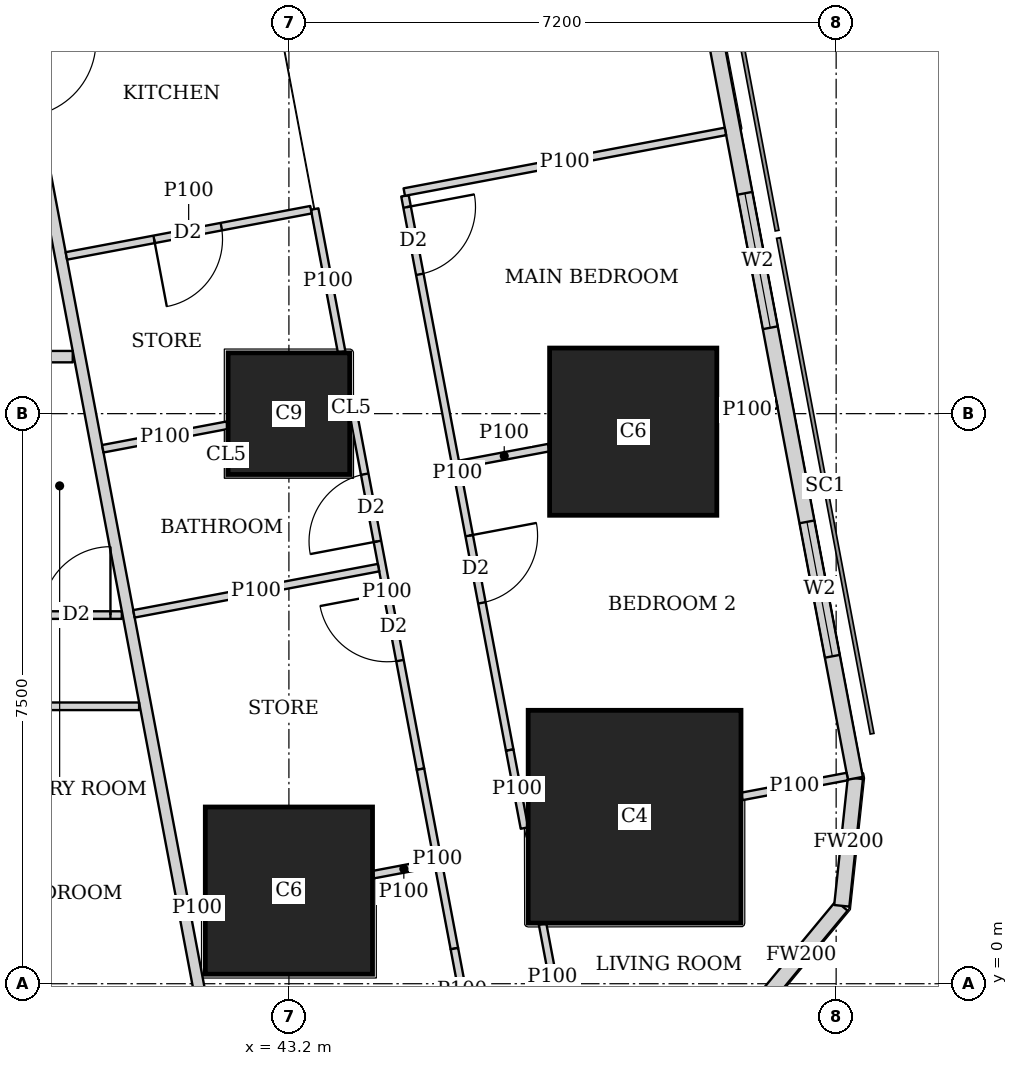
"""IFC4 building model, lengths in metres.
Left out: names, types, materials, properties, quantities, classifications, styles, units other than length and angle.
Written with IfcOpenShell. Run it as: python <this file> out.ifc"""

import sys

from ifc_helpers import new_model, si_unit, direction, frame, frame_2d, origin, origin_2d, place, context, subcontext, project, spatial, rectangle, extrude, element, fill, save


model = new_model("IFC4")
c1 = context("Model", 3, precision=1e-05, world=origin(), true_north=direction((0.0, 1.0)))
c2 = subcontext(c1, "Body", "Model", "MODEL_VIEW")
j1 = project(units=[si_unit("LENGTHUNIT", "METRE"), si_unit("PLANEANGLEUNIT", "RADIAN")], contexts=[c1])
p1 = place(None, origin())
s1 = spatial("IfcSite", under=j1, at=p1, CompositionType="ELEMENT")
p2 = place(p1, origin())
s2 = spatial("IfcBuilding", under=s1, at=p2, CompositionType="ELEMENT")
p3 = place(p2, frame((0.0, 0.0, 100.4)))
s3 = spatial("IfcBuildingStorey", under=s2, at=p3, CompositionType="ELEMENT", Elevation=100.4)
p4 = place(p3, frame((43.2, 1.225, 0.0), z_axis=(0.0, 0.0, 1.0), x_axis=(1.0, 0.0, 0.0)))
e1 = element("IfcColumn", 1, at=p4, inside=s3, PredefinedType="COLUMN", context=c2, shape_type="SweptSolid", body=[
    extrude(rectangle(XDim=2.2, YDim=2.2, at=origin_2d()), origin(), (0.0, 0.0, 1.0), 3.75),
])
p5 = place(p3, frame((47.748, 2.197, 0.0), z_axis=(0.0, 0.0, 1.0), x_axis=(1.0, 0.0, 0.0)))
e2 = element("IfcColumn", 2, at=p5, inside=s3, PredefinedType="COLUMN", context=c2, shape_type="SweptSolid", body=[
    extrude(rectangle(XDim=2.8, YDim=2.8, at=origin_2d()), origin(), (0.0, 0.0, 1.0), 3.75),
])
p6 = place(p3, frame((43.2, 7.5, 0.0), z_axis=(0.0, 0.0, 1.0), x_axis=(1.0, 0.0, 0.0)))
e3 = element("IfcColumn", 3, at=p6, inside=s3, PredefinedType="COLUMN", context=c2, shape_type="SweptSolid", body=[
    extrude(rectangle(XDim=1.6, YDim=1.6, at=origin_2d()), origin(), (0.0, 0.0, 1.0), 3.75),
])
p7 = place(p3, frame((47.73, 7.263, 0.0), z_axis=(0.0, 0.0, 1.0), x_axis=(1.0, 0.0, 0.0)))
e4 = element("IfcColumn", 4, at=p7, inside=s3, PredefinedType="COLUMN", context=c2, shape_type="SweptSolid", body=[
    extrude(rectangle(XDim=2.2, YDim=2.2, at=origin_2d()), origin(), (0.0, 0.0, 1.0), 3.75),
])
p8 = place(p3, frame((49.407, -0.263, 0.0), z_axis=(0.0, 0.0, 1.0), x_axis=(0.638042593423, 0.770001070764, 0.0)))
e5 = element("IfcWall", 5, at=p8, inside=s3, PredefinedType="SOLIDWALL", context=c2, shape_type="SweptSolid", body=[
    extrude(rectangle(XDim=1.673, YDim=0.2, at=frame_2d((0.836, 0.0))), origin(), (0.0, 0.0, 1.0), 3.5),
])
p9 = place(p3, frame((50.474, 1.025, 0.0), z_axis=(0.0, 0.0, 1.0), x_axis=(0.106047815515, 0.994361031429, 0.0)))
e6 = element("IfcWall", 6, at=p9, inside=s3, PredefinedType="SOLIDWALL", context=c2, shape_type="SweptSolid", body=[
    extrude(rectangle(XDim=1.688, YDim=0.2, at=frame_2d((0.844, 0.0))), origin(), (0.0, 0.0, 1.0), 3.5),
])
p10 = place(p3, frame((50.653, 2.703, 0.0), z_axis=(0.0, 0.0, 1.0), x_axis=(-0.185612026696, 0.982623109613, 0.0)))
e7 = element("IfcWall", 7, at=p10, inside=s3, PredefinedType="SOLIDWALL", context=c2, shape_type="SweptSolid", body=[
    extrude(rectangle(XDim=41.393, YDim=0.2, at=frame_2d((20.697, 0.0))), origin(), (0.0, 0.0, 1.0), 3.5),
])
p11 = place(p10, frame((1.633, 0.0, 0.9)))
e8 = element("IfcOpeningElement", 8, at=p11, cuts=e7, PredefinedType="OPENING", context=c2, shape_type="SweptSolid", body=[
    extrude(rectangle(XDim=1.8, YDim=1.5, at=frame_2d((0.9, 0.75))), frame((0.0, 0.11, 0.0), z_axis=(0.0, -1.0, 0.0), x_axis=(1.0, 0.0, 0.0)), (0.0, 0.0, 1.0), 0.22),
])
p12 = place(p10, frame((6.032, 0.0, 0.9)))
e9 = element("IfcOpeningElement", 9, at=p12, cuts=e7, PredefinedType="OPENING", context=c2, shape_type="SweptSolid", body=[
    extrude(rectangle(XDim=1.8, YDim=1.5, at=frame_2d((0.9, 0.75))), frame((0.0, 0.11, 0.0), z_axis=(0.0, -1.0, 0.0), x_axis=(1.0, 0.0, 0.0)), (0.0, 0.0, 1.0), 0.22),
])
p13 = place(p10, frame((9.848, 0.0, 0.9)))
e10 = element("IfcOpeningElement", 10, at=p13, cuts=e7, PredefinedType="OPENING", context=c2, shape_type="SweptSolid", body=[
    extrude(rectangle(XDim=1.8, YDim=1.5, at=frame_2d((0.9, 0.75))), frame((0.0, 0.11, 0.0), z_axis=(0.0, -1.0, 0.0), x_axis=(1.0, 0.0, 0.0)), (0.0, 0.0, 1.0), 0.22),
])
p14 = place(p10, frame((13.664, 0.0, 0.9)))
e11 = element("IfcOpeningElement", 11, at=p14, cuts=e7, PredefinedType="OPENING", context=c2, shape_type="SweptSolid", body=[
    extrude(rectangle(XDim=1.8, YDim=1.5, at=frame_2d((0.9, 0.75))), frame((0.0, 0.11, 0.0), z_axis=(0.0, -1.0, 0.0), x_axis=(1.0, 0.0, 0.0)), (0.0, 0.0, 1.0), 0.22),
])
p15 = place(p10, frame((17.481, 0.0, 0.9)))
e12 = element("IfcOpeningElement", 12, at=p15, cuts=e7, PredefinedType="OPENING", context=c2, shape_type="SweptSolid", body=[
    extrude(rectangle(XDim=1.8, YDim=1.5, at=frame_2d((0.9, 0.75))), frame((0.0, 0.11, 0.0), z_axis=(0.0, -1.0, 0.0), x_axis=(1.0, 0.0, 0.0)), (0.0, 0.0, 1.0), 0.22),
])
p16 = place(p10, frame((21.297, 0.0, 0.9)))
e13 = element("IfcOpeningElement", 13, at=p16, cuts=e7, PredefinedType="OPENING", context=c2, shape_type="SweptSolid", body=[
    extrude(rectangle(XDim=1.8, YDim=1.5, at=frame_2d((0.9, 0.75))), frame((0.0, 0.11, 0.0), z_axis=(0.0, -1.0, 0.0), x_axis=(1.0, 0.0, 0.0)), (0.0, 0.0, 1.0), 0.22),
])
p17 = place(p10, frame((25.113, 0.0, 0.9)))
e14 = element("IfcOpeningElement", 14, at=p17, cuts=e7, PredefinedType="OPENING", context=c2, shape_type="SweptSolid", body=[
    extrude(rectangle(XDim=1.8, YDim=1.5, at=frame_2d((0.9, 0.75))), frame((0.0, 0.11, 0.0), z_axis=(0.0, -1.0, 0.0), x_axis=(1.0, 0.0, 0.0)), (0.0, 0.0, 1.0), 0.22),
])
p18 = place(p10, frame((28.93, 0.0, 0.9)))
e15 = element("IfcOpeningElement", 15, at=p18, cuts=e7, PredefinedType="OPENING", context=c2, shape_type="SweptSolid", body=[
    extrude(rectangle(XDim=1.8, YDim=1.5, at=frame_2d((0.9, 0.75))), frame((0.0, 0.11, 0.0), z_axis=(0.0, -1.0, 0.0), x_axis=(1.0, 0.0, 0.0)), (0.0, 0.0, 1.0), 0.22),
])
p19 = place(p10, frame((32.746, 0.0, 0.9)))
e16 = element("IfcOpeningElement", 16, at=p19, cuts=e7, PredefinedType="OPENING", context=c2, shape_type="SweptSolid", body=[
    extrude(rectangle(XDim=1.8, YDim=1.5, at=frame_2d((0.9, 0.75))), frame((0.0, 0.11, 0.0), z_axis=(0.0, -1.0, 0.0), x_axis=(1.0, 0.0, 0.0)), (0.0, 0.0, 1.0), 0.22),
])
p20 = place(p10, frame((36.481, 0.0, 0.9)))
e17 = element("IfcOpeningElement", 17, at=p20, cuts=e7, PredefinedType="OPENING", context=c2, shape_type="SweptSolid", body=[
    extrude(rectangle(XDim=1.8, YDim=1.5, at=frame_2d((0.9, 0.75))), frame((0.0, 0.11, 0.0), z_axis=(0.0, -1.0, 0.0), x_axis=(1.0, 0.0, 0.0)), (0.0, 0.0, 1.0), 0.22),
])
p21 = place(p3, frame((40.356, 8.25, 0.0), z_axis=(0.0, 0.0, 1.0), x_axis=(-1.0, 0.0, 0.0)))
e18 = element("IfcWall", 18, at=p21, inside=s3, PredefinedType="SOLIDWALL", context=c2, shape_type="SweptSolid", body=[
    extrude(rectangle(XDim=3.555, YDim=0.15, at=frame_2d((1.777, 0.0))), origin(), (0.0, 0.0, 1.0), 3.5),
])
p22 = place(p3, frame((33.382, 45.65, 0.0), z_axis=(0.0, 0.0, 1.0), x_axis=(0.185593544777, -0.982626600565, 0.0)))
e19 = element("IfcWall", 19, at=p22, inside=s3, PredefinedType="SOLIDWALL", context=c2, shape_type="SweptSolid", body=[
    extrude(rectangle(XDim=47.118, YDim=0.15, at=frame_2d((23.559, 0.0))), origin(), (0.0, 0.0, 1.0), 2.2),
])
p23 = place(p22, frame((10.662, 0.0, 0.0)))
e20 = element("IfcOpeningElement", 20, at=p23, cuts=e19, PredefinedType="OPENING", context=c2, shape_type="SweptSolid", body=[
    extrude(rectangle(XDim=1.0, YDim=2.1, at=frame_2d((0.5, 1.05))), frame((0.0, 0.085, 0.0), z_axis=(0.0, -1.0, 0.0), x_axis=(1.0, 0.0, 0.0)), (0.0, 0.0, 1.0), 0.17),
])
p24 = place(p22, frame((15.237, 0.0, 0.0)))
e21 = element("IfcOpeningElement", 21, at=p24, cuts=e19, PredefinedType="OPENING", context=c2, shape_type="SweptSolid", body=[
    extrude(rectangle(XDim=1.0, YDim=2.1, at=frame_2d((0.5, 1.05))), frame((0.0, 0.085, 0.0), z_axis=(0.0, -1.0, 0.0), x_axis=(1.0, 0.0, 0.0)), (0.0, 0.0, 1.0), 0.17),
])
p25 = place(p22, frame((27.341, 0.0, 0.0)))
e22 = element("IfcOpeningElement", 22, at=p25, cuts=e19, PredefinedType="OPENING", context=c2, shape_type="SweptSolid", body=[
    extrude(rectangle(XDim=1.0, YDim=2.1, at=frame_2d((0.5, 1.05))), frame((0.0, 0.085, 0.0), z_axis=(0.0, -1.0, 0.0), x_axis=(1.0, 0.0, 0.0)), (0.0, 0.0, 1.0), 0.17),
])
p26 = place(p22, frame((33.833, 0.0, 0.0)))
e23 = element("IfcOpeningElement", 23, at=p26, cuts=e19, PredefinedType="OPENING", context=c2, shape_type="SweptSolid", body=[
    extrude(rectangle(XDim=1.0, YDim=2.1, at=frame_2d((0.5, 1.05))), frame((0.0, 0.085, 0.0), z_axis=(0.0, -1.0, 0.0), x_axis=(1.0, 0.0, 0.0)), (0.0, 0.0, 1.0), 0.17),
])
p27 = place(p3, frame((41.229, 3.65, 0.0), z_axis=(0.0, 0.0, 1.0), x_axis=(-1.0, 0.0, 0.0)))
e24 = element("IfcWall", 24, at=p27, inside=s3, PredefinedType="PARTITIONING", context=c2, shape_type="SweptSolid", body=[
    extrude(rectangle(XDim=5.229, YDim=0.1, at=frame_2d((2.615, 0.0))), origin(), (0.0, 0.0, 1.0), 3.5),
])
p28 = place(p27, frame((4.129, 0.0, 0.0)))
e25 = element("IfcOpeningElement", 25, at=p28, cuts=e24, PredefinedType="OPENING", context=c2, shape_type="SweptSolid", body=[
    extrude(rectangle(XDim=0.9, YDim=2.1, at=frame_2d((0.45, 1.05))), frame((0.0, 0.06, 0.0), z_axis=(0.0, -1.0, 0.0), x_axis=(1.0, 0.0, 0.0)), (0.0, 0.0, 1.0), 0.12),
])
p29 = place(p3, frame((41.002, 4.85, 0.0), z_axis=(0.0, 0.0, 1.0), x_axis=(-1.0, 0.0, 0.0)))
e26 = element("IfcWall", 26, at=p29, inside=s3, PredefinedType="PARTITIONING", context=c2, shape_type="SweptSolid", body=[
    extrude(rectangle(XDim=5.002, YDim=0.1, at=frame_2d((2.501, 0.0))), origin(), (0.0, 0.0, 1.0), 3.5),
])
p30 = place(p29, frame((3.447, 0.0, 0.0)))
e27 = element("IfcOpeningElement", 27, at=p30, cuts=e26, PredefinedType="OPENING", context=c2, shape_type="SweptSolid", body=[
    extrude(rectangle(XDim=0.9, YDim=2.1, at=frame_2d((0.45, 1.05))), frame((0.0, 0.06, 0.0), z_axis=(0.0, -1.0, 0.0), x_axis=(1.0, 0.0, 0.0)), (0.0, 0.0, 1.0), 0.12),
])
p31 = place(p29, frame((0.15, 0.0, 0.0)))
e28 = element("IfcOpeningElement", 28, at=p31, cuts=e26, PredefinedType="OPENING", context=c2, shape_type="SweptSolid", body=[
    extrude(rectangle(XDim=0.9, YDim=2.1, at=frame_2d((0.45, 1.05))), frame((0.0, 0.06, 0.0), z_axis=(0.0, -1.0, 0.0), x_axis=(1.0, 0.0, 0.0)), (0.0, 0.0, 1.0), 0.12),
])
p32 = place(p29, frame((1.647, 0.0, 0.0)))
e29 = element("IfcOpeningElement", 29, at=p32, cuts=e26, PredefinedType="OPENING", context=c2, shape_type="SweptSolid", body=[
    extrude(rectangle(XDim=0.9, YDim=2.1, at=frame_2d((0.45, 1.05))), frame((0.0, 0.06, 0.0), z_axis=(0.0, -1.0, 0.0), x_axis=(1.0, 0.0, 0.0)), (0.0, 0.0, 1.0), 0.12),
])
p33 = place(p3, frame((44.727, 10.366, 0.0), z_axis=(0.0, 0.0, 1.0), x_axis=(0.185678775129, -0.982610498858, 0.0)))
e30 = element("IfcWall", 30, at=p33, inside=s3, PredefinedType="PARTITIONING", context=c2, shape_type="SweptSolid", body=[
    extrude(rectangle(XDim=7.421, YDim=0.1, at=frame_2d((3.71, 0.0))), origin(), (0.0, 0.0, 1.0), 3.5),
])
p34 = place(p33, frame((0.151, 0.0, 0.0)))
e31 = element("IfcOpeningElement", 31, at=p34, cuts=e30, PredefinedType="OPENING", context=c2, shape_type="SweptSolid", body=[
    extrude(rectangle(XDim=0.9, YDim=2.1, at=frame_2d((0.45, 1.05))), frame((0.0, 0.06, 0.0), z_axis=(0.0, -1.0, 0.0), x_axis=(1.0, 0.0, 0.0)), (0.0, 0.0, 1.0), 0.12),
])
p35 = place(p33, frame((4.55, 0.0, 0.0)))
e32 = element("IfcOpeningElement", 32, at=p35, cuts=e30, PredefinedType="OPENING", context=c2, shape_type="SweptSolid", body=[
    extrude(rectangle(XDim=0.9, YDim=2.1, at=frame_2d((0.45, 1.05))), frame((0.0, 0.06, 0.0), z_axis=(0.0, -1.0, 0.0), x_axis=(1.0, 0.0, 0.0)), (0.0, 0.0, 1.0), 0.12),
])
p36 = place(p3, frame((46.105, 3.074, 0.0), z_axis=(0.0, 0.0, 1.0), x_axis=(0.185897769544, -0.982569091351, 0.0)))
e33 = element("IfcWall", 33, at=p36, inside=s3, PredefinedType="PARTITIONING", context=c2, shape_type="SweptSolid", body=[
    extrude(rectangle(XDim=1.044, YDim=0.1, at=frame_2d((0.522, 0.0))), origin(), (0.0, 0.0, 1.0), 2.05),
])
p37 = place(p3, frame((46.537, 0.787, 0.0), z_axis=(0.0, 0.0, 1.0), x_axis=(0.185348284603, -0.982672892368, 0.0)))
e34 = element("IfcWall", 34, at=p37, inside=s3, PredefinedType="PARTITIONING", context=c2, shape_type="SweptSolid", body=[
    extrude(rectangle(XDim=1.419, YDim=0.1, at=frame_2d((0.709, 0.0))), origin(), (0.0, 0.0, 1.0), 2.05),
])
p38 = place(p3, frame((43.539, 10.192, 0.0), z_axis=(0.0, 0.0, 1.0), x_axis=(0.185366049966, -0.982669541362, 0.0)))
e35 = element("IfcWall", 35, at=p38, inside=s3, PredefinedType="PARTITIONING", context=c2, shape_type="SweptSolid", body=[
    extrude(rectangle(XDim=1.915, YDim=0.1, at=frame_2d((0.958, 0.0))), origin(), (0.0, 0.0, 1.0), 3.5),
])
p39 = place(p3, frame((44.049, 7.49, 0.0), z_axis=(0.0, 0.0, 1.0), x_axis=(0.185666332607, -0.982612849975, 0.0)))
e36 = element("IfcWall", 36, at=p39, inside=s3, PredefinedType="PARTITIONING", context=c2, shape_type="SweptSolid", body=[
    extrude(rectangle(XDim=4.75, YDim=0.1, at=frame_2d((2.375, 0.0))), origin(), (0.0, 0.0, 1.0), 3.5),
])
p40 = place(p39, frame((0.8, 0.0, 0.0)))
e37 = element("IfcOpeningElement", 37, at=p40, cuts=e36, PredefinedType="OPENING", context=c2, shape_type="SweptSolid", body=[
    extrude(rectangle(XDim=0.9, YDim=2.1, at=frame_2d((0.45, 1.05))), frame((0.0, 0.06, 0.0), z_axis=(0.0, -1.0, 0.0), x_axis=(1.0, 0.0, 0.0)), (0.0, 0.0, 1.0), 0.12),
])
p41 = place(p39, frame((2.396, 0.0, 0.0)))
e38 = element("IfcOpeningElement", 38, at=p41, cuts=e36, PredefinedType="OPENING", context=c2, shape_type="SweptSolid", body=[
    extrude(rectangle(XDim=0.9, YDim=2.1, at=frame_2d((0.45, 1.05))), frame((0.0, 0.06, 0.0), z_axis=(0.0, -1.0, 0.0), x_axis=(1.0, 0.0, 0.0)), (0.0, 0.0, 1.0), 0.12),
])
p42 = place(p3, frame((44.931, 2.823, 0.0), z_axis=(0.0, 0.0, 1.0), x_axis=(0.185631845838, -0.982619365681, 0.0)))
e39 = element("IfcWall", 39, at=p42, inside=s3, PredefinedType="PARTITIONING", context=c2, shape_type="SweptSolid", body=[
    extrude(rectangle(XDim=2.403, YDim=0.1, at=frame_2d((1.201, 0.0))), origin(), (0.0, 0.0, 1.0), 2.05),
])
p43 = place(p3, frame((45.377, 0.462, 0.0), z_axis=(0.0, 0.0, 1.0), x_axis=(0.185513480919, -0.982641719243, 0.0)))
e40 = element("IfcWall", 40, at=p43, inside=s3, PredefinedType="PARTITIONING", context=c2, shape_type="SweptSolid", body=[
    extrude(rectangle(XDim=1.095, YDim=0.1, at=frame_2d((0.547, 0.0))), origin(), (0.0, 0.0, 1.0), 3.5),
])
p44 = place(p3, frame((48.943, 11.213, 0.0), z_axis=(0.0, 0.0, 1.0), x_axis=(-0.982633535512, -0.185556823879, 0.0)))
e41 = element("IfcWall", 41, at=p44, inside=s3, PredefinedType="PARTITIONING", context=c2, shape_type="SweptSolid", body=[
    extrude(rectangle(XDim=4.3, YDim=0.1, at=frame_2d((2.15, 0.0))), origin(), (0.0, 0.0, 1.0), 2.2),
])
p45 = place(p3, frame((49.622, 7.62, 0.0), z_axis=(0.0, 0.0, 1.0), x_axis=(-0.982512656401, -0.186195810938, 0.0)))
e42 = element("IfcWall", 42, at=p45, inside=s3, PredefinedType="PARTITIONING", context=c2, shape_type="SweptSolid", body=[
    extrude(rectangle(XDim=0.796, YDim=0.1, at=frame_2d((0.398, 0.0))), origin(), (0.0, 0.0, 1.0), 2.05),
])
p46 = place(p3, frame((46.62, 7.053, 0.0), z_axis=(0.0, 0.0, 1.0), x_axis=(-0.982749355621, -0.18494243436, 0.0)))
e43 = element("IfcWall", 43, at=p46, inside=s3, PredefinedType="PARTITIONING", context=c2, shape_type="SweptSolid", body=[
    extrude(rectangle(XDim=1.195, YDim=0.1, at=frame_2d((0.597, 0.0))), origin(), (0.0, 0.0, 1.0), 2.05),
])
p47 = place(p3, frame((50.547, 2.726, 0.0), z_axis=(0.0, 0.0, 1.0), x_axis=(-0.982680053146, -0.185310315822, 0.0)))
e44 = element("IfcWall", 44, at=p47, inside=s3, PredefinedType="PARTITIONING", context=c2, shape_type="SweptSolid", body=[
    extrude(rectangle(XDim=1.414, YDim=0.1, at=frame_2d((0.707, 0.0))), origin(), (0.0, 0.0, 1.0), 3.5),
])
p48 = place(p3, frame((43.49, 10.183, 0.0), z_axis=(0.0, 0.0, 1.0), x_axis=(-0.982607026909, -0.185697147715, 0.0)))
e45 = element("IfcWall", 45, at=p48, inside=s3, PredefinedType="PARTITIONING", context=c2, shape_type="SweptSolid", body=[
    extrude(rectangle(XDim=3.275, YDim=0.1, at=frame_2d((1.637, 0.0))), origin(), (0.0, 0.0, 1.0), 3.5),
])
p49 = place(p48, frame((1.2, 0.0, 0.0)))
e46 = element("IfcOpeningElement", 46, at=p49, cuts=e45, PredefinedType="OPENING", context=c2, shape_type="SweptSolid", body=[
    extrude(rectangle(XDim=0.9, YDim=2.1, at=frame_2d((0.45, 1.05))), frame((0.0, 0.06, 0.0), z_axis=(0.0, -1.0, 0.0), x_axis=(1.0, 0.0, 0.0)), (0.0, 0.0, 1.0), 0.12),
])
p50 = place(p3, frame((42.39, 7.348, 0.0), z_axis=(0.0, 0.0, 1.0), x_axis=(-0.9825976927, -0.185746532405, 0.0)))
e47 = element("IfcWall", 47, at=p50, inside=s3, PredefinedType="PARTITIONING", context=c2, shape_type="SweptSolid", body=[
    extrude(rectangle(XDim=1.668, YDim=0.1, at=frame_2d((0.834, 0.0))), origin(), (0.0, 0.0, 1.0), 3.5),
])
p51 = place(p3, frame((45.114, 1.587, 0.0), z_axis=(0.0, 0.0, 1.0), x_axis=(-0.982624706348, -0.185603573443, 0.0)))
e48 = element("IfcWall", 48, at=p51, inside=s3, PredefinedType="PARTITIONING", context=c2, shape_type="SweptSolid", body=[
    extrude(rectangle(XDim=0.818, YDim=0.1, at=frame_2d((0.409, 0.0))), origin(), (0.0, 0.0, 1.0), 2.05),
])
p52 = place(p3, frame((42.09, 1.016, 0.0), z_axis=(0.0, 0.0, 1.0), x_axis=(-0.982208563973, -0.187793335502, 0.0)))
e49 = element("IfcWall", 49, at=p52, inside=s3, PredefinedType="PARTITIONING", context=c2, shape_type="SweptSolid", body=[
    extrude(rectangle(XDim=0.198, YDim=0.1, at=frame_2d((0.099, 0.0))), origin(), (0.0, 0.0, 1.0), 2.05),
])
p53 = place(p3, frame((44.379, 5.474, 0.0), z_axis=(0.0, 0.0, 1.0), x_axis=(-0.982607026909, -0.185697147715, 0.0)))
e50 = element("IfcWall", 50, at=p53, inside=s3, PredefinedType="PARTITIONING", context=c2, shape_type="SweptSolid", body=[
    extrude(rectangle(XDim=3.275, YDim=0.1, at=frame_2d((1.637, 0.0))), origin(), (0.0, 0.0, 1.0), 3.5),
])
p54 = place(p11, origin())
e51 = element("IfcWindow", 51, at=p54, inside=s3, PartitioningType="SINGLE_PANEL", PredefinedType="WINDOW", context=c2, shape_type="SweptSolid", body=[
    extrude(rectangle(XDim=1.8, YDim=1.5, at=frame_2d((0.9, 0.75))), frame((0.0, 0.03, 0.0), z_axis=(0.0, -1.0, 0.0), x_axis=(1.0, 0.0, 0.0)), (0.0, 0.0, 1.0), 0.06),
])
fill(e8, e51)
p55 = place(p12, origin())
e52 = element("IfcWindow", 52, at=p55, inside=s3, PartitioningType="SINGLE_PANEL", PredefinedType="WINDOW", context=c2, shape_type="SweptSolid", body=[
    extrude(rectangle(XDim=1.8, YDim=1.5, at=frame_2d((0.9, 0.75))), frame((0.0, 0.03, 0.0), z_axis=(0.0, -1.0, 0.0), x_axis=(1.0, 0.0, 0.0)), (0.0, 0.0, 1.0), 0.06),
])
fill(e9, e52)
p56 = place(p31, origin())
e53 = element("IfcDoor", 53, at=p56, inside=s3, OperationType="SINGLE_SWING_RIGHT", PredefinedType="DOOR", context=c2, shape_type="SweptSolid", body=[
    extrude(rectangle(XDim=0.9, YDim=2.1, at=frame_2d((0.45, 1.05))), frame((0.0, 0.025, 0.0), z_axis=(0.0, -1.0, 0.0), x_axis=(1.0, 0.0, 0.0)), (0.0, 0.0, 1.0), 0.05),
])
fill(e28, e53)
p57 = place(p34, origin())
e54 = element("IfcDoor", 54, at=p57, inside=s3, OperationType="SINGLE_SWING_LEFT", PredefinedType="DOOR", context=c2, shape_type="SweptSolid", body=[
    extrude(rectangle(XDim=0.9, YDim=2.1, at=frame_2d((0.45, 1.05))), frame((0.0, 0.025, 0.0), z_axis=(0.0, -1.0, 0.0), x_axis=(1.0, 0.0, 0.0)), (0.0, 0.0, 1.0), 0.05),
])
fill(e31, e54)
p58 = place(p35, origin())
e55 = element("IfcDoor", 55, at=p58, inside=s3, OperationType="SINGLE_SWING_LEFT", PredefinedType="DOOR", context=c2, shape_type="SweptSolid", body=[
    extrude(rectangle(XDim=0.9, YDim=2.1, at=frame_2d((0.45, 1.05))), frame((0.0, 0.025, 0.0), z_axis=(0.0, -1.0, 0.0), x_axis=(1.0, 0.0, 0.0)), (0.0, 0.0, 1.0), 0.05),
])
fill(e32, e55)
p59 = place(p40, origin())
e56 = element("IfcDoor", 56, at=p59, inside=s3, OperationType="SINGLE_SWING_LEFT", PredefinedType="DOOR", context=c2, shape_type="SweptSolid", body=[
    extrude(rectangle(XDim=0.9, YDim=2.1, at=frame_2d((0.45, 1.05))), frame((0.0, 0.025, 0.0), z_axis=(0.0, -1.0, 0.0), x_axis=(1.0, 0.0, 0.0)), (0.0, 0.0, 1.0), 0.05),
])
fill(e37, e56)
p60 = place(p41, origin())
e57 = element("IfcDoor", 57, at=p60, inside=s3, OperationType="SINGLE_SWING_RIGHT", PredefinedType="DOOR", context=c2, shape_type="SweptSolid", body=[
    extrude(rectangle(XDim=0.9, YDim=2.1, at=frame_2d((0.45, 1.05))), frame((0.0, 0.025, 0.0), z_axis=(0.0, -1.0, 0.0), x_axis=(1.0, 0.0, 0.0)), (0.0, 0.0, 1.0), 0.05),
])
fill(e38, e57)
p61 = place(p49, origin())
e58 = element("IfcDoor", 58, at=p61, inside=s3, OperationType="SINGLE_SWING_RIGHT", PredefinedType="DOOR", context=c2, shape_type="SweptSolid", body=[
    extrude(rectangle(XDim=0.9, YDim=2.1, at=frame_2d((0.45, 1.05))), frame((0.0, 0.025, 0.0), z_axis=(0.0, -1.0, 0.0), x_axis=(1.0, 0.0, 0.0)), (0.0, 0.0, 1.0), 0.05),
])
fill(e46, e58)
save(model, sys.argv[1])
